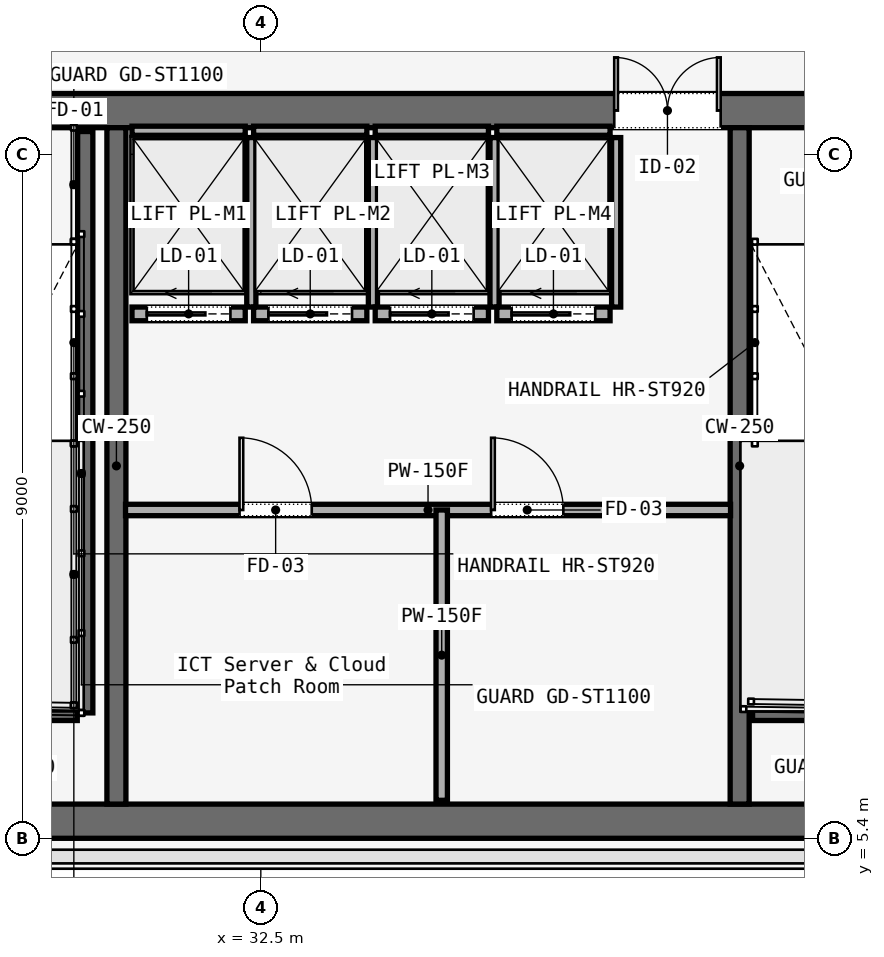
"""IFC4 building model, lengths in metres.
Left out: names, types, materials, properties, quantities, classifications, styles, units other than length and angle.
Written with IfcOpenShell. Run it as: python <this file> out.ifc"""

import sys

from ifc_helpers import new_model, si_unit, direction, frame, frame_2d, origin, place, context, subcontext, project, spatial, rectangle, extrude, element, fill, save


model = new_model("IFC4")
c1 = context("Model", 3, precision=1e-05, world=origin(), true_north=direction((0.0, 1.0)))
c2 = subcontext(c1, "Body", "Model", "MODEL_VIEW")
j1 = project(units=[si_unit("LENGTHUNIT", "METRE"), si_unit("PLANEANGLEUNIT", "RADIAN")], contexts=[c1])
p1 = place(None, origin())
s1 = spatial("IfcSite", under=j1, at=p1, CompositionType="ELEMENT")
p2 = place(p1, origin())
s2 = spatial("IfcBuilding", under=s1, at=p2, CompositionType="ELEMENT")
p3 = place(p2, frame((0.0, 0.0, 130.8)))
s3 = spatial("IfcBuildingStorey", under=s2, at=p3, CompositionType="ELEMENT", Elevation=130.8)
p4 = place(p3, frame((26.45, 14.975, 0.0), z_axis=(0.0, 0.0, 1.0), x_axis=(1.0, 0.0, 0.0)))
e1 = element("IfcWall", 1, at=p4, inside=s3, PredefinedType="SOLIDWALL", context=c2, shape_type="SweptSolid", body=[
    extrude(rectangle(XDim=31.1, YDim=0.45, at=frame_2d((15.55, 0.0))), origin(), (0.0, 0.0, 1.0), 3.58),
])
p5 = place(p4, frame((1.65, 0.0, 0.0)))
e2 = element("IfcOpeningElement", 2, at=p5, cuts=e1, PredefinedType="OPENING", context=c2, shape_type="SweptSolid", body=[
    extrude(rectangle(XDim=1.1, YDim=2.2, at=frame_2d((0.55, 1.1))), frame((0.0, 0.225, 0.0), z_axis=(0.0, -1.0, 0.0), x_axis=(1.0, 0.0, 0.0)), (0.0, 0.0, 1.0), 0.45),
])
p6 = place(p4, frame((13.65, 0.0, 0.0)))
e3 = element("IfcOpeningElement", 3, at=p6, cuts=e1, PredefinedType="OPENING", context=c2, shape_type="SweptSolid", body=[
    extrude(rectangle(XDim=1.1, YDim=2.2, at=frame_2d((0.55, 1.1))), frame((0.0, 0.225, 0.0), z_axis=(0.0, -1.0, 0.0), x_axis=(1.0, 0.0, 0.0)), (0.0, 0.0, 1.0), 0.45),
])
p7 = place(p4, frame((25.55, 0.0, 0.0)))
e4 = element("IfcOpeningElement", 4, at=p7, cuts=e1, PredefinedType="OPENING", context=c2, shape_type="SweptSolid", body=[
    extrude(rectangle(XDim=1.1, YDim=2.2, at=frame_2d((0.55, 1.1))), frame((0.0, 0.225, 0.0), z_axis=(0.0, -1.0, 0.0), x_axis=(1.0, 0.0, 0.0)), (0.0, 0.0, 1.0), 0.45),
])
p8 = place(p4, frame((10.7, 0.0, 0.0)))
e5 = element("IfcOpeningElement", 5, at=p8, cuts=e1, PredefinedType="OPENING", context=c2, shape_type="SweptSolid", body=[
    extrude(rectangle(XDim=1.4, YDim=2.2, at=frame_2d((0.7, 1.1))), frame((0.0, 0.225, 0.0), z_axis=(0.0, -1.0, 0.0), x_axis=(1.0, 0.0, 0.0)), (0.0, 0.0, 1.0), 0.45),
])
p9 = place(p4, frame((19.35, 0.0, 0.0)))
e6 = element("IfcOpeningElement", 6, at=p9, cuts=e1, PredefinedType="OPENING", context=c2, shape_type="SweptSolid", body=[
    extrude(rectangle(XDim=1.1, YDim=2.2, at=frame_2d((0.55, 1.1))), frame((0.0, 0.225, 0.0), z_axis=(0.0, -1.0, 0.0), x_axis=(1.0, 0.0, 0.0)), (0.0, 0.0, 1.0), 0.45),
])
p10 = place(p4, frame((21.4, 0.0, 0.0)))
e7 = element("IfcOpeningElement", 7, at=p10, cuts=e1, PredefinedType="OPENING", context=c2, shape_type="SweptSolid", body=[
    extrude(rectangle(XDim=0.9, YDim=2.1, at=frame_2d((0.45, 1.05))), frame((0.0, 0.225, 0.0), z_axis=(0.0, -1.0, 0.0), x_axis=(1.0, 0.0, 0.0)), (0.0, 0.0, 1.0), 0.45),
])
p11 = place(p4, frame((23.35, 0.0, 0.0)))
e8 = element("IfcOpeningElement", 8, at=p11, cuts=e1, PredefinedType="OPENING", context=c2, shape_type="SweptSolid", body=[
    extrude(rectangle(XDim=1.3, YDim=2.3, at=frame_2d((0.65, 1.15))), frame((0.0, 0.225, 0.0), z_axis=(0.0, -1.0, 0.0), x_axis=(1.0, 0.0, 0.0)), (0.0, 0.0, 1.0), 0.45),
])
p12 = place(p3, frame((26.45, 5.625, 0.0), z_axis=(0.0, 0.0, 1.0), x_axis=(1.0, 0.0, 0.0)))
e9 = element("IfcWall", 9, at=p12, inside=s3, PredefinedType="SOLIDWALL", context=c2, shape_type="SweptSolid", body=[
    extrude(rectangle(XDim=31.1, YDim=0.45, at=frame_2d((15.55, 0.0))), origin(), (0.0, 0.0, 1.0), 3.58),
])
for number, where, z_axis, x_axis in (
    (10, (30.6, 5.85, 0.0), (0.0, 0.0, 1.0), (0.0, 1.0, 0.0)),
    (11, (38.8, 5.85, 0.0), (0.0, 0.0, 1.0), (0.0, 1.0, 0.0)),
):
    element("IfcWall", number, at=place(p3, frame(where, z_axis=z_axis, x_axis=x_axis)), inside=s3, PredefinedType="SOLIDWALL", context=c2, shape_type="SweptSolid", body=[
        extrude(rectangle(XDim=8.9, YDim=0.25, at=frame_2d((4.45, 0.0))), origin(), (0.0, 0.0, 1.0), 3.58),
    ])
p13 = place(p3, frame((30.19, 14.7, 0.0), z_axis=(0.0, 0.0, 1.0), x_axis=(0.0, -1.0, 0.0)))
e12 = element("IfcWall", 12, at=p13, inside=s3, PredefinedType="SOLIDWALL", context=c2, shape_type="SweptSolid", body=[
    extrude(rectangle(XDim=7.65, YDim=0.2, at=frame_2d((3.825, 0.0))), origin(), (0.0, 0.0, 1.0), 3.8),
])
for number, where, z_axis, x_axis in (
    (13, (26.97, 7.05, 0.0), (0.0, 0.0, 1.0), (1.0, 0.0, 0.0)),
    (14, (38.97, 7.05, 0.0), (0.0, 0.0, 1.0), (1.0, 0.0, 0.0)),
):
    element("IfcWall", number, at=place(p3, frame(where, z_axis=z_axis, x_axis=x_axis)), inside=s3, PredefinedType="SOLIDWALL", context=c2, shape_type="SweptSolid", body=[
        extrude(rectangle(XDim=3.115, YDim=0.2, at=frame_2d((1.558, 0.0))), origin(), (0.0, 0.0, 1.0), 3.8),
    ])
p14 = place(p3, frame((30.72, 9.72, 0.0), z_axis=(0.0, 0.0, 1.0), x_axis=(1.0, 0.0, 0.0)))
e15 = element("IfcWall", 15, at=p14, inside=s3, PredefinedType="PARTITIONING", context=c2, shape_type="SweptSolid", body=[
    extrude(rectangle(XDim=7.96, YDim=0.15, at=frame_2d((3.98, 0.0))), origin(), (0.0, 0.0, 1.0), 3.01),
])
p15 = place(p14, frame((1.5, 0.0, 0.0)))
e16 = element("IfcOpeningElement", 16, at=p15, cuts=e15, PredefinedType="OPENING", context=c2, shape_type="SweptSolid", body=[
    extrude(rectangle(XDim=0.95, YDim=2.2, at=frame_2d((0.475, 1.1))), frame((0.0, 0.075, 0.0), z_axis=(0.0, -1.0, 0.0), x_axis=(1.0, 0.0, 0.0)), (0.0, 0.0, 1.0), 0.15),
])
p16 = place(p14, frame((4.81, 0.0, 0.0)))
e17 = element("IfcOpeningElement", 17, at=p16, cuts=e15, PredefinedType="OPENING", context=c2, shape_type="SweptSolid", body=[
    extrude(rectangle(XDim=0.95, YDim=2.2, at=frame_2d((0.475, 1.1))), frame((0.0, 0.075, 0.0), z_axis=(0.0, -1.0, 0.0), x_axis=(1.0, 0.0, 0.0)), (0.0, 0.0, 1.0), 0.15),
])
p17 = place(p3, frame((34.88, 5.9, 0.0), z_axis=(0.0, 0.0, 1.0), x_axis=(0.0, 1.0, 0.0)))
e18 = element("IfcWall", 18, at=p17, inside=s3, PredefinedType="PARTITIONING", context=c2, shape_type="SweptSolid", body=[
    extrude(rectangle(XDim=3.82, YDim=0.15, at=frame_2d((1.91, 0.0))), origin(), (0.0, 0.0, 1.0), 3.01),
])
p18 = place(p3, frame((30.805, 12.3, 0.0), z_axis=(0.0, 0.0, 1.0), x_axis=(1.0, 0.0, 0.0)))
e19 = element("IfcWall", 19, at=p18, inside=s3, PredefinedType="SOLIDWALL", context=c2, shape_type="SweptSolid", body=[
    extrude(rectangle(XDim=1.49, YDim=0.18, at=frame_2d((0.745, 0.0))), origin(), (0.0, 0.0, 1.0), 3.01),
])
p19 = place(p18, frame((0.195, 0.0, 0.0)))
e20 = element("IfcOpeningElement", 20, at=p19, cuts=e19, PredefinedType="OPENING", context=c2, shape_type="SweptSolid", body=[
    extrude(rectangle(XDim=1.1, YDim=2.2, at=frame_2d((0.55, 1.1))), frame((0.0, 0.09, 0.0), z_axis=(0.0, -1.0, 0.0), x_axis=(1.0, 0.0, 0.0)), (0.0, 0.0, 1.0), 0.18),
])
p20 = place(p3, frame((30.805, 14.71, 0.0), z_axis=(0.0, 0.0, 1.0), x_axis=(1.0, 0.0, 0.0)))
e21 = element("IfcWall", 21, at=p20, inside=s3, PredefinedType="SOLIDWALL", context=c2, shape_type="SweptSolid", body=[
    extrude(rectangle(XDim=1.49, YDim=0.12, at=frame_2d((0.745, 0.0))), origin(), (0.0, 0.0, 1.0), 3.01),
])
p21 = place(p3, frame((32.375, 12.39, 0.0), z_axis=(0.0, 0.0, 1.0), x_axis=(0.0, 1.0, 0.0)))
e22 = element("IfcWall", 22, at=p21, inside=s3, PredefinedType="SOLIDWALL", context=c2, shape_type="SweptSolid", body=[
    extrude(rectangle(XDim=2.23, YDim=0.12, at=frame_2d((1.115, 0.0))), origin(), (0.0, 0.0, 1.0), 3.01),
])
p22 = place(p3, frame((32.405, 12.3, 0.0), z_axis=(0.0, 0.0, 1.0), x_axis=(1.0, 0.0, 0.0)))
e23 = element("IfcWall", 23, at=p22, inside=s3, PredefinedType="SOLIDWALL", context=c2, shape_type="SweptSolid", body=[
    extrude(rectangle(XDim=1.49, YDim=0.18, at=frame_2d((0.745, 0.0))), origin(), (0.0, 0.0, 1.0), 3.01),
])
p23 = place(p22, frame((0.195, 0.0, 0.0)))
e24 = element("IfcOpeningElement", 24, at=p23, cuts=e23, PredefinedType="OPENING", context=c2, shape_type="SweptSolid", body=[
    extrude(rectangle(XDim=1.1, YDim=2.2, at=frame_2d((0.55, 1.1))), frame((0.0, 0.09, 0.0), z_axis=(0.0, -1.0, 0.0), x_axis=(1.0, 0.0, 0.0)), (0.0, 0.0, 1.0), 0.18),
])
p24 = place(p3, frame((32.405, 14.71, 0.0), z_axis=(0.0, 0.0, 1.0), x_axis=(1.0, 0.0, 0.0)))
e25 = element("IfcWall", 25, at=p24, inside=s3, PredefinedType="SOLIDWALL", context=c2, shape_type="SweptSolid", body=[
    extrude(rectangle(XDim=1.49, YDim=0.12, at=frame_2d((0.745, 0.0))), origin(), (0.0, 0.0, 1.0), 3.01),
])
p25 = place(p3, frame((33.975, 12.39, 0.0), z_axis=(0.0, 0.0, 1.0), x_axis=(0.0, 1.0, 0.0)))
e26 = element("IfcWall", 26, at=p25, inside=s3, PredefinedType="SOLIDWALL", context=c2, shape_type="SweptSolid", body=[
    extrude(rectangle(XDim=2.23, YDim=0.12, at=frame_2d((1.115, 0.0))), origin(), (0.0, 0.0, 1.0), 3.01),
])
p26 = place(p3, frame((34.005, 12.3, 0.0), z_axis=(0.0, 0.0, 1.0), x_axis=(1.0, 0.0, 0.0)))
e27 = element("IfcWall", 27, at=p26, inside=s3, PredefinedType="SOLIDWALL", context=c2, shape_type="SweptSolid", body=[
    extrude(rectangle(XDim=1.49, YDim=0.18, at=frame_2d((0.745, 0.0))), origin(), (0.0, 0.0, 1.0), 3.01),
])
p27 = place(p26, frame((0.195, 0.0, 0.0)))
e28 = element("IfcOpeningElement", 28, at=p27, cuts=e27, PredefinedType="OPENING", context=c2, shape_type="SweptSolid", body=[
    extrude(rectangle(XDim=1.1, YDim=2.2, at=frame_2d((0.55, 1.1))), frame((0.0, 0.09, 0.0), z_axis=(0.0, -1.0, 0.0), x_axis=(1.0, 0.0, 0.0)), (0.0, 0.0, 1.0), 0.18),
])
p28 = place(p3, frame((34.005, 14.71, 0.0), z_axis=(0.0, 0.0, 1.0), x_axis=(1.0, 0.0, 0.0)))
e29 = element("IfcWall", 29, at=p28, inside=s3, PredefinedType="SOLIDWALL", context=c2, shape_type="SweptSolid", body=[
    extrude(rectangle(XDim=1.49, YDim=0.12, at=frame_2d((0.745, 0.0))), origin(), (0.0, 0.0, 1.0), 3.01),
])
p29 = place(p3, frame((35.575, 12.39, 0.0), z_axis=(0.0, 0.0, 1.0), x_axis=(0.0, 1.0, 0.0)))
e30 = element("IfcWall", 30, at=p29, inside=s3, PredefinedType="SOLIDWALL", context=c2, shape_type="SweptSolid", body=[
    extrude(rectangle(XDim=2.23, YDim=0.12, at=frame_2d((1.115, 0.0))), origin(), (0.0, 0.0, 1.0), 3.01),
])
p30 = place(p3, frame((35.605, 12.3, 0.0), z_axis=(0.0, 0.0, 1.0), x_axis=(1.0, 0.0, 0.0)))
e31 = element("IfcWall", 31, at=p30, inside=s3, PredefinedType="SOLIDWALL", context=c2, shape_type="SweptSolid", body=[
    extrude(rectangle(XDim=1.49, YDim=0.18, at=frame_2d((0.745, 0.0))), origin(), (0.0, 0.0, 1.0), 3.01),
])
p31 = place(p30, frame((0.195, 0.0, 0.0)))
e32 = element("IfcOpeningElement", 32, at=p31, cuts=e31, PredefinedType="OPENING", context=c2, shape_type="SweptSolid", body=[
    extrude(rectangle(XDim=1.1, YDim=2.2, at=frame_2d((0.55, 1.1))), frame((0.0, 0.09, 0.0), z_axis=(0.0, -1.0, 0.0), x_axis=(1.0, 0.0, 0.0)), (0.0, 0.0, 1.0), 0.18),
])
p32 = place(p3, frame((35.605, 14.71, 0.0), z_axis=(0.0, 0.0, 1.0), x_axis=(1.0, 0.0, 0.0)))
e33 = element("IfcWall", 33, at=p32, inside=s3, PredefinedType="SOLIDWALL", context=c2, shape_type="SweptSolid", body=[
    extrude(rectangle(XDim=1.49, YDim=0.12, at=frame_2d((0.745, 0.0))), origin(), (0.0, 0.0, 1.0), 3.01),
])
p33 = place(p3, frame((37.175, 12.39, 0.0), z_axis=(0.0, 0.0, 1.0), x_axis=(0.0, 1.0, 0.0)))
e34 = element("IfcWall", 34, at=p33, inside=s3, PredefinedType="SOLIDWALL", context=c2, shape_type="SweptSolid", body=[
    extrude(rectangle(XDim=2.23, YDim=0.12, at=frame_2d((1.115, 0.0))), origin(), (0.0, 0.0, 1.0), 3.01),
])
p34 = place(p8, origin())
e35 = element("IfcDoor", 35, at=p34, inside=s3, OperationType="DOUBLE_DOOR_SINGLE_SWING", PredefinedType="DOOR", context=c2, shape_type="SweptSolid", body=[
    extrude(rectangle(XDim=1.4, YDim=2.2, at=frame_2d((0.7, 1.1))), frame((0.0, 0.025, 0.0), z_axis=(0.0, -1.0, 0.0), x_axis=(1.0, 0.0, 0.0)), (0.0, 0.0, 1.0), 0.05),
])
fill(e5, e35)
p35 = place(p15, origin())
e36 = element("IfcDoor", 36, at=p35, inside=s3, OperationType="SINGLE_SWING_LEFT", PredefinedType="DOOR", context=c2, shape_type="SweptSolid", body=[
    extrude(rectangle(XDim=0.95, YDim=2.2, at=frame_2d((0.475, 1.1))), frame((0.0, 0.025, 0.0), z_axis=(0.0, -1.0, 0.0), x_axis=(1.0, 0.0, 0.0)), (0.0, 0.0, 1.0), 0.05),
])
fill(e16, e36)
p36 = place(p16, origin())
e37 = element("IfcDoor", 37, at=p36, inside=s3, OperationType="SINGLE_SWING_RIGHT", PredefinedType="DOOR", context=c2, shape_type="SweptSolid", body=[
    extrude(rectangle(XDim=0.95, YDim=2.2, at=frame_2d((0.475, 1.1))), frame((0.0, 0.025, 0.0), z_axis=(0.0, -1.0, 0.0), x_axis=(1.0, 0.0, 0.0)), (0.0, 0.0, 1.0), 0.05),
])
fill(e17, e37)
p37 = place(p19, origin())
e38 = element("IfcDoor", 38, at=p37, inside=s3, OperationType="SLIDING_TO_LEFT", PredefinedType="DOOR", context=c2, shape_type="SweptSolid", body=[
    extrude(rectangle(XDim=1.1, YDim=2.2, at=frame_2d((0.55, 1.1))), frame((0.0, 0.025, 0.0), z_axis=(0.0, -1.0, 0.0), x_axis=(1.0, 0.0, 0.0)), (0.0, 0.0, 1.0), 0.05),
])
fill(e20, e38)
p38 = place(p23, origin())
e39 = element("IfcDoor", 39, at=p38, inside=s3, OperationType="SLIDING_TO_LEFT", PredefinedType="DOOR", context=c2, shape_type="SweptSolid", body=[
    extrude(rectangle(XDim=1.1, YDim=2.2, at=frame_2d((0.55, 1.1))), frame((0.0, 0.025, 0.0), z_axis=(0.0, -1.0, 0.0), x_axis=(1.0, 0.0, 0.0)), (0.0, 0.0, 1.0), 0.05),
])
fill(e24, e39)
p39 = place(p27, origin())
e40 = element("IfcDoor", 40, at=p39, inside=s3, OperationType="SLIDING_TO_LEFT", PredefinedType="DOOR", context=c2, shape_type="SweptSolid", body=[
    extrude(rectangle(XDim=1.1, YDim=2.2, at=frame_2d((0.55, 1.1))), frame((0.0, 0.025, 0.0), z_axis=(0.0, -1.0, 0.0), x_axis=(1.0, 0.0, 0.0)), (0.0, 0.0, 1.0), 0.05),
])
fill(e28, e40)
p40 = place(p31, origin())
e41 = element("IfcDoor", 41, at=p40, inside=s3, OperationType="SLIDING_TO_LEFT", PredefinedType="DOOR", context=c2, shape_type="SweptSolid", body=[
    extrude(rectangle(XDim=1.1, YDim=2.2, at=frame_2d((0.55, 1.1))), frame((0.0, 0.025, 0.0), z_axis=(0.0, -1.0, 0.0), x_axis=(1.0, 0.0, 0.0)), (0.0, 0.0, 1.0), 0.05),
])
fill(e32, e41)
save(model, sys.argv[1])
